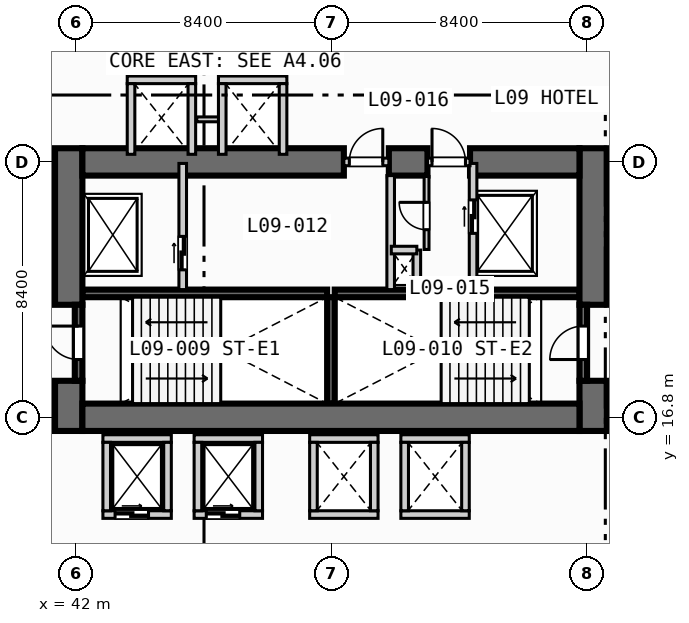
"""IFC4 building model, lengths in metres.
Left out: names, types, materials, properties, quantities, classifications, styles, units other than length and angle.
Written with IfcOpenShell. Run it as: python <this file> out.ifc"""

import sys

from ifc_helpers import new_model, si_unit, direction, frame, frame_2d, origin, place, context, subcontext, project, spatial, rectangle, extrude, element, fill, save


model = new_model("IFC4")
c1 = context("Model", 3, precision=1e-05, world=origin(), true_north=direction((0.0, 1.0)))
c2 = subcontext(c1, "Body", "Model", "MODEL_VIEW")
j1 = project(units=[si_unit("LENGTHUNIT", "METRE"), si_unit("PLANEANGLEUNIT", "RADIAN")], contexts=[c1])
p1 = place(None, origin())
s1 = spatial("IfcSite", under=j1, at=p1, CompositionType="ELEMENT")
p2 = place(p1, origin())
s2 = spatial("IfcBuilding", under=s1, at=p2, CompositionType="ELEMENT")
p3 = place(p2, frame((0.0, 0.0, 43.4)))
s3 = spatial("IfcBuildingStorey", under=s2, at=p3, CompositionType="ELEMENT", Elevation=43.4)
for number, where, z_axis, x_axis in (
    (1, (42.2, 20.875, 0.0), (0.0, 0.0, 1.0), (1.0, 0.0, 0.0)),
    (2, (50.5, 20.875, 0.0), (0.0, 0.0, 1.0), (1.0, 0.0, 0.0)),
):
    element("IfcWall", number, at=place(p3, frame(where, z_axis=z_axis, x_axis=x_axis)), inside=s3, PredefinedType="SOLIDWALL", context=c2, shape_type="SweptSolid", body=[
        extrude(rectangle(XDim=8.05, YDim=0.25, at=frame_2d((4.025, 0.0))), origin(), (0.0, 0.0, 1.0), 3.55),
    ])
p4 = place(p3, frame((50.375, 17.25, 0.0), z_axis=(0.0, 0.0, 1.0), x_axis=(0.0, 1.0, 0.0)))
e3 = element("IfcWall", 3, at=p4, inside=s3, PredefinedType="SOLIDWALL", context=c2, shape_type="SweptSolid", body=[
    extrude(rectangle(XDim=3.5, YDim=0.25, at=frame_2d((1.75, 0.0))), origin(), (0.0, 0.0, 1.0), 3.55),
])
p5 = place(p3, frame((41.75, 16.35, 0.0), z_axis=(0.0, 0.0, 1.0), x_axis=(0.0, 1.0, 0.0)))
e4 = element("IfcWall", 4, at=p5, inside=s3, PredefinedType="SHEAR", context=c2, shape_type="SweptSolid", body=[
    extrude(rectangle(XDim=1.65, YDim=0.9, at=frame_2d((0.825, 0.0))), origin(), (0.0, 0.0, 1.0), 3.55),
])
p6 = place(p3, frame((41.75, 20.5, 0.0), z_axis=(0.0, 0.0, 1.0), x_axis=(0.0, 1.0, 0.0)))
e5 = element("IfcWall", 5, at=p6, inside=s3, PredefinedType="SHEAR", context=c2, shape_type="SweptSolid", body=[
    extrude(rectangle(XDim=5.15, YDim=0.9, at=frame_2d((2.575, 0.0))), origin(), (0.0, 0.0, 1.0), 3.55),
])
p7 = place(p3, frame((59.0, 16.35, 0.0), z_axis=(0.0, 0.0, 1.0), x_axis=(0.0, 1.0, 0.0)))
e6 = element("IfcWall", 6, at=p7, inside=s3, PredefinedType="SHEAR", context=c2, shape_type="SweptSolid", body=[
    extrude(rectangle(XDim=1.65, YDim=0.9, at=frame_2d((0.825, 0.0))), origin(), (0.0, 0.0, 1.0), 3.55),
])
p8 = place(p3, frame((59.0, 20.5, 0.0), z_axis=(0.0, 0.0, 1.0), x_axis=(0.0, 1.0, 0.0)))
e7 = element("IfcWall", 7, at=p8, inside=s3, PredefinedType="SHEAR", context=c2, shape_type="SweptSolid", body=[
    extrude(rectangle(XDim=5.15, YDim=0.9, at=frame_2d((2.575, 0.0))), origin(), (0.0, 0.0, 1.0), 3.55),
])
p9 = place(p3, frame((42.2, 16.8, 0.0), z_axis=(0.0, 0.0, 1.0), x_axis=(1.0, 0.0, 0.0)))
e8 = element("IfcWall", 8, at=p9, inside=s3, PredefinedType="SHEAR", context=c2, shape_type="SweptSolid", body=[
    extrude(rectangle(XDim=16.35, YDim=0.9, at=frame_2d((8.175, 0.0))), origin(), (0.0, 0.0, 1.0), 3.55),
])
p10 = place(p3, frame((42.2, 25.2, 0.0), z_axis=(0.0, 0.0, 1.0), x_axis=(1.0, 0.0, 0.0)))
e9 = element("IfcWall", 9, at=p10, inside=s3, PredefinedType="SHEAR", context=c2, shape_type="SweptSolid", body=[
    extrude(rectangle(XDim=8.6, YDim=0.9, at=frame_2d((4.3, 0.0))), origin(), (0.0, 0.0, 1.0), 3.55),
])
p11 = place(p3, frame((52.28, 25.2, 0.0), z_axis=(0.0, 0.0, 1.0), x_axis=(1.0, 0.0, 0.0)))
e10 = element("IfcWall", 10, at=p11, inside=s3, PredefinedType="SHEAR", context=c2, shape_type="SweptSolid", body=[
    extrude(rectangle(XDim=1.27, YDim=0.9, at=frame_2d((0.635, 0.0))), origin(), (0.0, 0.0, 1.0), 3.55),
])
p12 = place(p3, frame((54.95, 25.2, 0.0), z_axis=(0.0, 0.0, 1.0), x_axis=(1.0, 0.0, 0.0)))
e11 = element("IfcWall", 11, at=p12, inside=s3, PredefinedType="SHEAR", context=c2, shape_type="SweptSolid", body=[
    extrude(rectangle(XDim=3.6, YDim=0.9, at=frame_2d((1.8, 0.0))), origin(), (0.0, 0.0, 1.0), 3.55),
])
p13 = place(p3, frame((42.075, 18.0, 0.0), z_axis=(0.0, 0.0, 1.0), x_axis=(0.0, 1.0, 0.0)))
e12 = element("IfcWall", 12, at=p13, inside=s3, PredefinedType="SOLIDWALL", context=c2, shape_type="SweptSolid", body=[
    extrude(rectangle(XDim=2.5, YDim=0.25, at=frame_2d((1.25, 0.0))), origin(), (0.0, 0.0, 1.0), 3.55),
])
p14 = place(p13, frame((0.7, 0.0, 0.0)))
e13 = element("IfcOpeningElement", 13, at=p14, cuts=e12, PredefinedType="OPENING", context=c2, shape_type="SweptSolid", body=[
    extrude(rectangle(XDim=1.1, YDim=2.15, at=frame_2d((0.55, 1.075))), frame((0.0, 0.135, 0.0), z_axis=(0.0, -1.0, 0.0), x_axis=(1.0, 0.0, 0.0)), (0.0, 0.0, 1.0), 0.27),
])
p15 = place(p3, frame((58.675, 18.0, 0.0), z_axis=(0.0, 0.0, 1.0), x_axis=(0.0, 1.0, 0.0)))
e14 = element("IfcWall", 14, at=p15, inside=s3, PredefinedType="SOLIDWALL", context=c2, shape_type="SweptSolid", body=[
    extrude(rectangle(XDim=2.5, YDim=0.25, at=frame_2d((1.25, 0.0))), origin(), (0.0, 0.0, 1.0), 3.55),
])
p16 = place(p15, frame((0.7, 0.0, 0.0)))
e15 = element("IfcOpeningElement", 15, at=p16, cuts=e14, PredefinedType="OPENING", context=c2, shape_type="SweptSolid", body=[
    extrude(rectangle(XDim=1.1, YDim=2.15, at=frame_2d((0.55, 1.075))), frame((0.0, 0.135, 0.0), z_axis=(0.0, -1.0, 0.0), x_axis=(1.0, 0.0, 0.0)), (0.0, 0.0, 1.0), 0.27),
])
p17 = place(p3, frame((45.5, 21.0, 0.0), z_axis=(0.0, 0.0, 1.0), x_axis=(0.0, 1.0, 0.0)))
e16 = element("IfcWall", 16, at=p17, inside=s3, PredefinedType="SOLIDWALL", context=c2, shape_type="SweptSolid", body=[
    extrude(rectangle(XDim=4.15, YDim=0.25, at=frame_2d((2.075, 0.0))), origin(), (0.0, 0.0, 1.0), 3.55),
])
p18 = place(p17, frame((0.65, 0.0, 0.0)))
e17 = element("IfcOpeningElement", 17, at=p18, cuts=e16, PredefinedType="OPENING", context=c2, shape_type="SweptSolid", body=[
    extrude(rectangle(XDim=1.1, YDim=2.15, at=frame_2d((0.55, 1.075))), frame((0.0, 0.135, 0.0), z_axis=(0.0, -1.0, 0.0), x_axis=(1.0, 0.0, 0.0)), (0.0, 0.0, 1.0), 0.27),
])
p19 = place(p3, frame((50.8, 25.2, 0.0), z_axis=(0.0, 0.0, 1.0), x_axis=(1.0, 0.0, 0.0)))
e18 = element("IfcWall", 18, at=p19, inside=s3, PredefinedType="SOLIDWALL", context=c2, shape_type="SweptSolid", body=[
    extrude(rectangle(XDim=1.48, YDim=0.25, at=frame_2d((0.74, 0.0))), origin(), (0.0, 0.0, 1.0), 3.55),
])
p20 = place(p19, frame((0.18, 0.0, 0.0)))
e19 = element("IfcOpeningElement", 19, at=p20, cuts=e18, PredefinedType="OPENING", context=c2, shape_type="SweptSolid", body=[
    extrude(rectangle(XDim=1.1, YDim=2.15, at=frame_2d((0.55, 1.075))), frame((0.0, 0.135, 0.0), z_axis=(0.0, -1.0, 0.0), x_axis=(1.0, 0.0, 0.0)), (0.0, 0.0, 1.0), 0.27),
])
p21 = place(p3, frame((52.34, 21.0, 0.0), z_axis=(0.0, 0.0, 1.0), x_axis=(0.0, 1.0, 0.0)))
e20 = element("IfcWall", 20, at=p21, inside=s3, PredefinedType="SOLIDWALL", context=c2, shape_type="SweptSolid", body=[
    extrude(rectangle(XDim=3.75, YDim=0.25, at=frame_2d((1.875, 0.0))), origin(), (0.0, 0.0, 1.0), 3.55),
])
p22 = place(p3, frame((55.05, 21.0, 0.0), z_axis=(0.0, 0.0, 1.0), x_axis=(0.0, 1.0, 0.0)))
e21 = element("IfcWall", 21, at=p22, inside=s3, PredefinedType="SOLIDWALL", context=c2, shape_type="SweptSolid", body=[
    extrude(rectangle(XDim=4.15, YDim=0.25, at=frame_2d((2.075, 0.0))), origin(), (0.0, 0.0, 1.0), 3.55),
])
p23 = place(p22, frame((1.85, 0.0, 0.0)))
e22 = element("IfcOpeningElement", 22, at=p23, cuts=e21, PredefinedType="OPENING", context=c2, shape_type="SweptSolid", body=[
    extrude(rectangle(XDim=1.1, YDim=2.15, at=frame_2d((0.55, 1.075))), frame((0.0, 0.135, 0.0), z_axis=(0.0, -1.0, 0.0), x_axis=(1.0, 0.0, 0.0)), (0.0, 0.0, 1.0), 0.27),
])
p24 = place(p3, frame((53.55, 25.2, 0.0), z_axis=(0.0, 0.0, 1.0), x_axis=(1.0, 0.0, 0.0)))
e23 = element("IfcWall", 23, at=p24, inside=s3, PredefinedType="SOLIDWALL", context=c2, shape_type="SweptSolid", body=[
    extrude(rectangle(XDim=1.4, YDim=0.25, at=frame_2d((0.7, 0.0))), origin(), (0.0, 0.0, 1.0), 3.55),
])
p25 = place(p24, frame((0.15, 0.0, 0.0)))
e24 = element("IfcOpeningElement", 24, at=p25, cuts=e23, PredefinedType="OPENING", context=c2, shape_type="SweptSolid", body=[
    extrude(rectangle(XDim=1.1, YDim=2.15, at=frame_2d((0.55, 1.075))), frame((0.0, 0.135, 0.0), z_axis=(0.0, -1.0, 0.0), x_axis=(1.0, 0.0, 0.0)), (0.0, 0.0, 1.0), 0.27),
])
p26 = place(p3, frame((53.2, 21.0, 0.0), z_axis=(0.0, 0.0, 1.0), x_axis=(0.0, 1.0, 0.0)))
e25 = element("IfcWall", 25, at=p26, inside=s3, PredefinedType="SOLIDWALL", context=c2, shape_type="SweptSolid", body=[
    extrude(rectangle(XDim=1.3, YDim=0.25, at=frame_2d((0.65, 0.0))), origin(), (0.0, 0.0, 1.0), 3.55),
])
p27 = place(p3, frame((52.36, 22.3, 0.0), z_axis=(0.0, 0.0, 1.0), x_axis=(1.0, 0.0, 0.0)))
e26 = element("IfcWall", 26, at=p27, inside=s3, PredefinedType="SOLIDWALL", context=c2, shape_type="SweptSolid", body=[
    extrude(rectangle(XDim=0.84, YDim=0.25, at=frame_2d((0.42, 0.0))), origin(), (0.0, 0.0, 1.0), 3.55),
])
p28 = place(p3, frame((53.52, 22.32, 0.0), z_axis=(0.0, 0.0, 1.0), x_axis=(0.0, 1.0, 0.0)))
e27 = element("IfcWall", 27, at=p28, inside=s3, PredefinedType="PARTITIONING", context=c2, shape_type="SweptSolid", body=[
    extrude(rectangle(XDim=2.4, YDim=0.16, at=frame_2d((1.2, 0.0))), origin(), (0.0, 0.0, 1.0), 3.55),
])
p29 = place(p28, frame((0.65, 0.0, 0.0)))
e28 = element("IfcOpeningElement", 28, at=p29, cuts=e27, PredefinedType="OPENING", context=c2, shape_type="SweptSolid", body=[
    extrude(rectangle(XDim=0.9, YDim=2.1, at=frame_2d((0.45, 1.05))), frame((0.0, 0.09, 0.0), z_axis=(0.0, -1.0, 0.0), x_axis=(1.0, 0.0, 0.0)), (0.0, 0.0, 1.0), 0.18),
])
p30 = place(p3, frame((42.875, 13.6, 0.0), z_axis=(0.0, 0.0, 1.0), x_axis=(1.0, 0.0, 0.0)))
e29 = element("IfcWall", 29, at=p30, inside=s3, PredefinedType="SOLIDWALL", context=c2, shape_type="SweptSolid", body=[
    extrude(rectangle(XDim=2.25, YDim=0.25, at=frame_2d((1.125, 0.0))), origin(), (0.0, 0.0, 1.0), 3.55),
])
p31 = place(p30, frame((0.4, 0.0, 0.0)))
e30 = element("IfcOpeningElement", 30, at=p31, cuts=e29, PredefinedType="OPENING", context=c2, shape_type="SweptSolid", body=[
    extrude(rectangle(XDim=1.1, YDim=2.15, at=frame_2d((0.55, 1.075))), frame((0.0, 0.135, 0.0), z_axis=(0.0, -1.0, 0.0), x_axis=(1.0, 0.0, 0.0)), (0.0, 0.0, 1.0), 0.27),
])
for number, where, z_axis, x_axis in (
    (31, (42.875, 16.1, 0.0), (0.0, 0.0, 1.0), (1.0, 0.0, 0.0)),
    (32, (43.0, 13.725, 0.0), (0.0, 0.0, 1.0), (0.0, 1.0, 0.0)),
    (33, (45.0, 13.725, 0.0), (0.0, 0.0, 1.0), (0.0, 1.0, 0.0)),
):
    element("IfcWall", number, at=place(p3, frame(where, z_axis=z_axis, x_axis=x_axis)), inside=s3, PredefinedType="SOLIDWALL", context=c2, shape_type="SweptSolid", body=[
        extrude(rectangle(XDim=2.25, YDim=0.25, at=frame_2d((1.125, 0.0))), origin(), (0.0, 0.0, 1.0), 3.55),
    ])
p32 = place(p3, frame((45.875, 13.6, 0.0), z_axis=(0.0, 0.0, 1.0), x_axis=(1.0, 0.0, 0.0)))
e34 = element("IfcWall", 34, at=p32, inside=s3, PredefinedType="SOLIDWALL", context=c2, shape_type="SweptSolid", body=[
    extrude(rectangle(XDim=2.25, YDim=0.25, at=frame_2d((1.125, 0.0))), origin(), (0.0, 0.0, 1.0), 3.55),
])
p33 = place(p32, frame((0.4, 0.0, 0.0)))
e35 = element("IfcOpeningElement", 35, at=p33, cuts=e34, PredefinedType="OPENING", context=c2, shape_type="SweptSolid", body=[
    extrude(rectangle(XDim=1.1, YDim=2.15, at=frame_2d((0.55, 1.075))), frame((0.0, 0.135, 0.0), z_axis=(0.0, -1.0, 0.0), x_axis=(1.0, 0.0, 0.0)), (0.0, 0.0, 1.0), 0.27),
])
for number, where, z_axis, x_axis in (
    (36, (45.875, 16.1, 0.0), (0.0, 0.0, 1.0), (1.0, 0.0, 0.0)),
    (37, (46.0, 13.725, 0.0), (0.0, 0.0, 1.0), (0.0, 1.0, 0.0)),
    (38, (48.0, 13.725, 0.0), (0.0, 0.0, 1.0), (0.0, 1.0, 0.0)),
    (39, (49.675, 13.6, 0.0), (0.0, 0.0, 1.0), (1.0, 0.0, 0.0)),
    (40, (49.675, 16.1, 0.0), (0.0, 0.0, 1.0), (1.0, 0.0, 0.0)),
    (41, (49.8, 13.725, 0.0), (0.0, 0.0, 1.0), (0.0, 1.0, 0.0)),
    (42, (51.8, 13.725, 0.0), (0.0, 0.0, 1.0), (0.0, 1.0, 0.0)),
    (43, (52.675, 13.6, 0.0), (0.0, 0.0, 1.0), (1.0, 0.0, 0.0)),
    (44, (52.675, 16.1, 0.0), (0.0, 0.0, 1.0), (1.0, 0.0, 0.0)),
    (45, (52.8, 13.725, 0.0), (0.0, 0.0, 1.0), (0.0, 1.0, 0.0)),
    (46, (54.8, 13.725, 0.0), (0.0, 0.0, 1.0), (0.0, 1.0, 0.0)),
    (47, (43.675, 27.9, 0.0), (0.0, 0.0, 1.0), (1.0, 0.0, 0.0)),
):
    element("IfcWall", number, at=place(p3, frame(where, z_axis=z_axis, x_axis=x_axis)), inside=s3, PredefinedType="SOLIDWALL", context=c2, shape_type="SweptSolid", body=[
        extrude(rectangle(XDim=2.25, YDim=0.25, at=frame_2d((1.125, 0.0))), origin(), (0.0, 0.0, 1.0), 3.55),
    ])
for number, where, z_axis, x_axis in (
    (48, (43.8, 25.45, 0.0), (0.0, 0.0, 1.0), (0.0, 1.0, 0.0)),
    (49, (45.8, 25.45, 0.0), (0.0, 0.0, 1.0), (0.0, 1.0, 0.0)),
):
    element("IfcWall", number, at=place(p3, frame(where, z_axis=z_axis, x_axis=x_axis)), inside=s3, PredefinedType="SOLIDWALL", context=c2, shape_type="SweptSolid", body=[
        extrude(rectangle(XDim=2.325, YDim=0.25, at=frame_2d((1.163, 0.0))), origin(), (0.0, 0.0, 1.0), 3.55),
    ])
p34 = place(p3, frame((45.96, 26.6, 0.0), z_axis=(0.0, 0.0, 1.0), x_axis=(1.0, 0.0, 0.0)))
e50 = element("IfcWall", 50, at=p34, inside=s3, PredefinedType="PARTITIONING", context=c2, shape_type="SweptSolid", body=[
    extrude(rectangle(XDim=0.88, YDim=0.16, at=frame_2d((0.44, 0.0))), origin(), (0.0, 0.0, 1.0), 3.55),
])
p35 = place(p3, frame((46.675, 27.9, 0.0), z_axis=(0.0, 0.0, 1.0), x_axis=(1.0, 0.0, 0.0)))
e51 = element("IfcWall", 51, at=p35, inside=s3, PredefinedType="SOLIDWALL", context=c2, shape_type="SweptSolid", body=[
    extrude(rectangle(XDim=2.25, YDim=0.25, at=frame_2d((1.125, 0.0))), origin(), (0.0, 0.0, 1.0), 3.55),
])
for number, where, z_axis, x_axis in (
    (52, (46.8, 25.45, 0.0), (0.0, 0.0, 1.0), (0.0, 1.0, 0.0)),
    (53, (48.8, 25.45, 0.0), (0.0, 0.0, 1.0), (0.0, 1.0, 0.0)),
):
    element("IfcWall", number, at=place(p3, frame(where, z_axis=z_axis, x_axis=x_axis)), inside=s3, PredefinedType="SOLIDWALL", context=c2, shape_type="SweptSolid", body=[
        extrude(rectangle(XDim=2.325, YDim=0.25, at=frame_2d((1.163, 0.0))), origin(), (0.0, 0.0, 1.0), 3.55),
    ])
p36 = place(p14, origin())
e54 = element("IfcDoor", 54, at=p36, inside=s3, OperationType="SINGLE_SWING_RIGHT", PredefinedType="DOOR", context=c2, shape_type="SweptSolid", body=[
    extrude(rectangle(XDim=1.1, YDim=2.15, at=frame_2d((0.55, 1.075))), frame((0.0, 0.025, 0.0), z_axis=(0.0, -1.0, 0.0), x_axis=(1.0, 0.0, 0.0)), (0.0, 0.0, 1.0), 0.05),
])
fill(e13, e54)
p37 = place(p16, origin())
e55 = element("IfcDoor", 55, at=p37, inside=s3, OperationType="SINGLE_SWING_LEFT", PredefinedType="DOOR", context=c2, shape_type="SweptSolid", body=[
    extrude(rectangle(XDim=1.1, YDim=2.15, at=frame_2d((0.55, 1.075))), frame((0.0, 0.025, 0.0), z_axis=(0.0, -1.0, 0.0), x_axis=(1.0, 0.0, 0.0)), (0.0, 0.0, 1.0), 0.05),
])
fill(e15, e55)
p38 = place(p18, origin())
e56 = element("IfcDoor", 56, at=p38, inside=s3, OperationType="SLIDING_TO_LEFT", PredefinedType="DOOR", context=c2, shape_type="SweptSolid", body=[
    extrude(rectangle(XDim=1.1, YDim=2.15, at=frame_2d((0.55, 1.075))), frame((0.0, 0.025, 0.0), z_axis=(0.0, -1.0, 0.0), x_axis=(1.0, 0.0, 0.0)), (0.0, 0.0, 1.0), 0.05),
])
fill(e17, e56)
p39 = place(p20, origin())
e57 = element("IfcDoor", 57, at=p39, inside=s3, OperationType="SINGLE_SWING_RIGHT", PredefinedType="DOOR", context=c2, shape_type="SweptSolid", body=[
    extrude(rectangle(XDim=1.1, YDim=2.15, at=frame_2d((0.55, 1.075))), frame((0.0, 0.025, 0.0), z_axis=(0.0, -1.0, 0.0), x_axis=(1.0, 0.0, 0.0)), (0.0, 0.0, 1.0), 0.05),
])
fill(e19, e57)
p40 = place(p23, origin())
e58 = element("IfcDoor", 58, at=p40, inside=s3, OperationType="SLIDING_TO_LEFT", PredefinedType="DOOR", context=c2, shape_type="SweptSolid", body=[
    extrude(rectangle(XDim=1.1, YDim=2.15, at=frame_2d((0.55, 1.075))), frame((0.0, 0.025, 0.0), z_axis=(0.0, -1.0, 0.0), x_axis=(1.0, 0.0, 0.0)), (0.0, 0.0, 1.0), 0.05),
])
fill(e22, e58)
p41 = place(p25, origin())
e59 = element("IfcDoor", 59, at=p41, inside=s3, OperationType="SINGLE_SWING_LEFT", PredefinedType="DOOR", context=c2, shape_type="SweptSolid", body=[
    extrude(rectangle(XDim=1.1, YDim=2.15, at=frame_2d((0.55, 1.075))), frame((0.0, 0.025, 0.0), z_axis=(0.0, -1.0, 0.0), x_axis=(1.0, 0.0, 0.0)), (0.0, 0.0, 1.0), 0.05),
])
fill(e24, e59)
p42 = place(p29, origin())
e60 = element("IfcDoor", 60, at=p42, inside=s3, OperationType="SINGLE_SWING_RIGHT", PredefinedType="DOOR", context=c2, shape_type="SweptSolid", body=[
    extrude(rectangle(XDim=0.9, YDim=2.1, at=frame_2d((0.45, 1.05))), frame((0.0, 0.025, 0.0), z_axis=(0.0, -1.0, 0.0), x_axis=(1.0, 0.0, 0.0)), (0.0, 0.0, 1.0), 0.05),
])
fill(e28, e60)
p43 = place(p31, origin())
e61 = element("IfcDoor", 61, at=p43, inside=s3, OperationType="SLIDING_TO_LEFT", PredefinedType="DOOR", context=c2, shape_type="SweptSolid", body=[
    extrude(rectangle(XDim=1.1, YDim=2.15, at=frame_2d((0.55, 1.075))), frame((0.0, 0.025, 0.0), z_axis=(0.0, -1.0, 0.0), x_axis=(1.0, 0.0, 0.0)), (0.0, 0.0, 1.0), 0.05),
])
fill(e30, e61)
p44 = place(p33, origin())
e62 = element("IfcDoor", 62, at=p44, inside=s3, OperationType="SLIDING_TO_LEFT", PredefinedType="DOOR", context=c2, shape_type="SweptSolid", body=[
    extrude(rectangle(XDim=1.1, YDim=2.15, at=frame_2d((0.55, 1.075))), frame((0.0, 0.025, 0.0), z_axis=(0.0, -1.0, 0.0), x_axis=(1.0, 0.0, 0.0)), (0.0, 0.0, 1.0), 0.05),
])
fill(e35, e62)
save(model, sys.argv[1])
